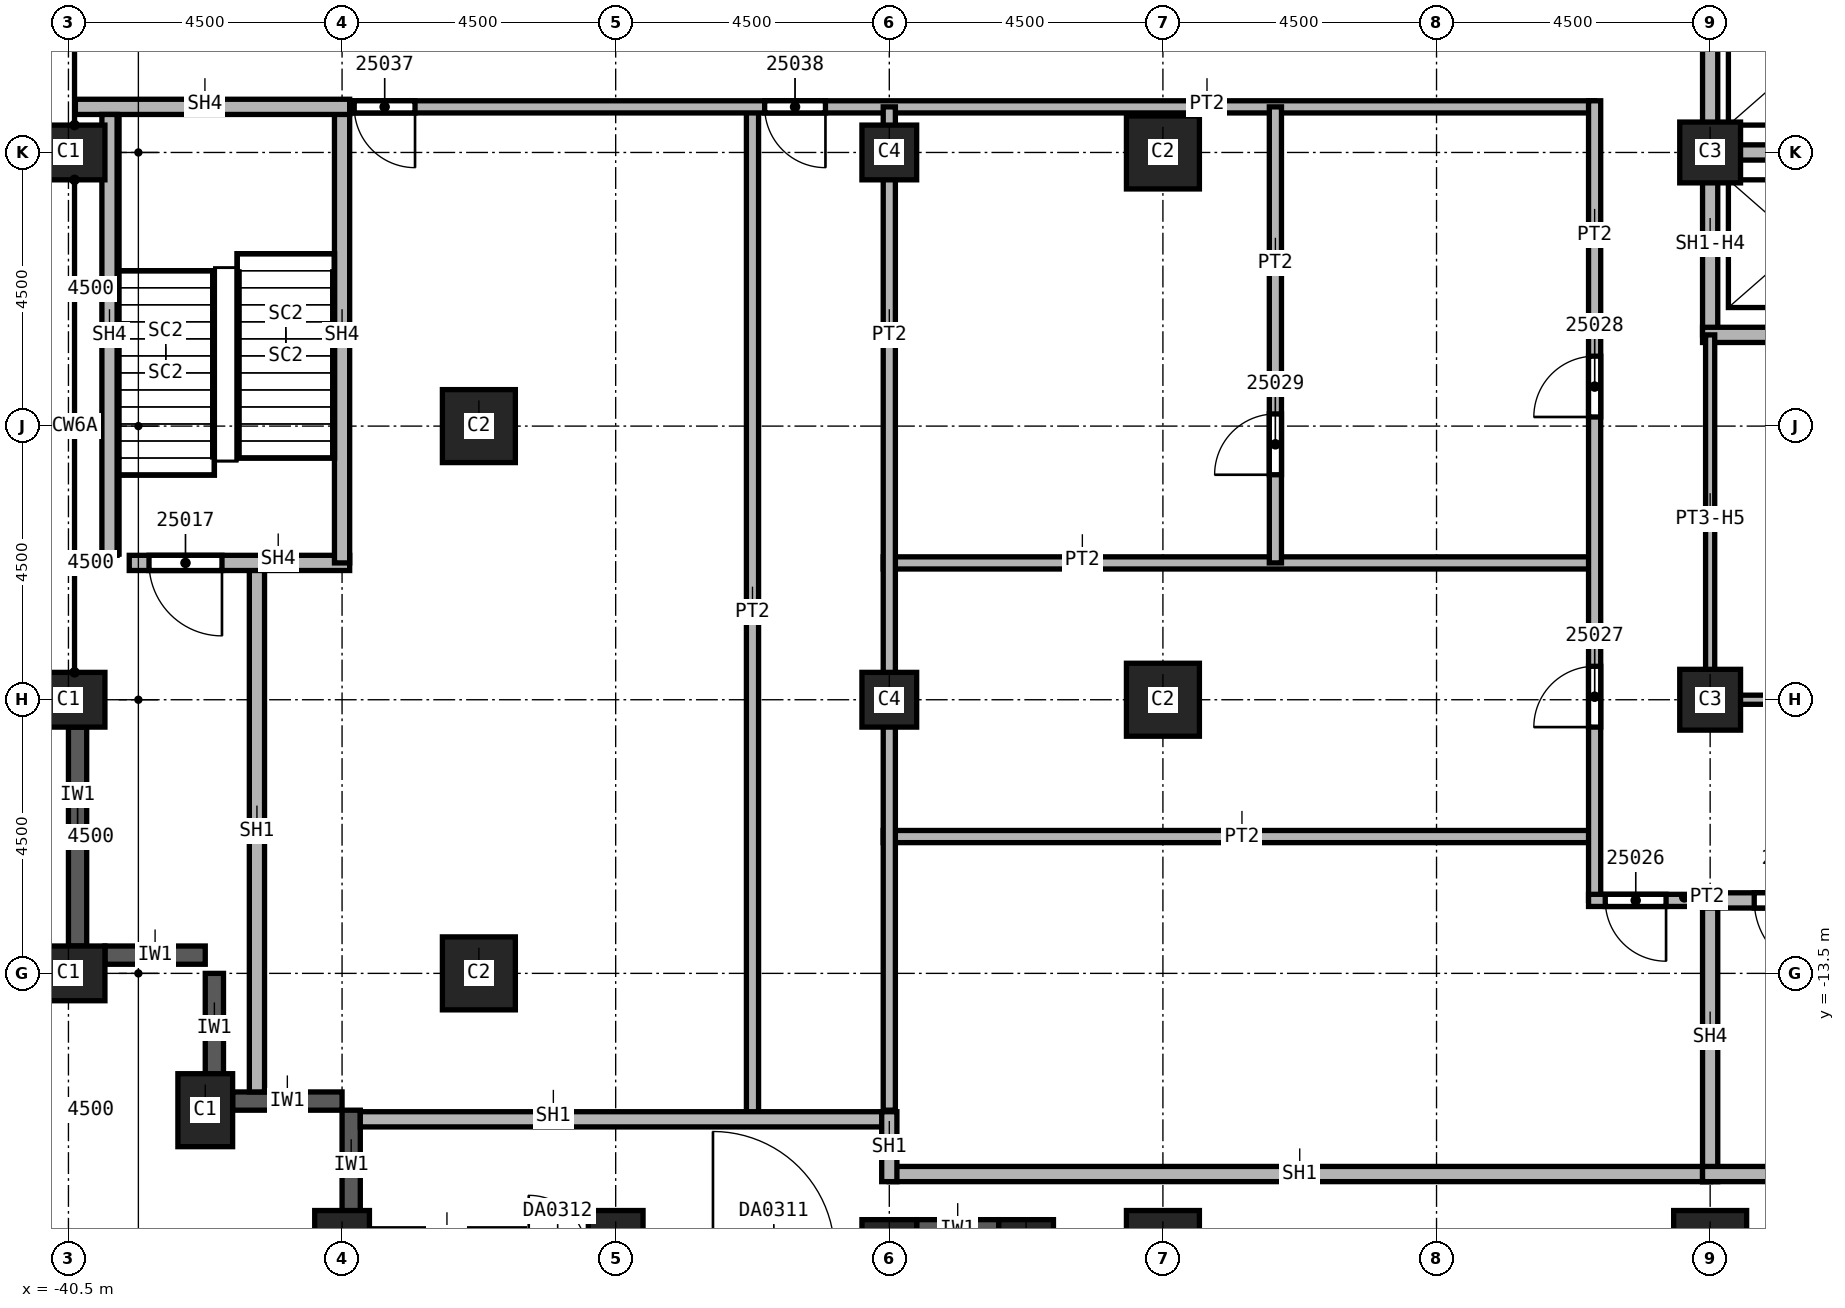
"""IFC4 building model, lengths in metres.
Left out: names, types, materials, properties, quantities, classifications, styles, units other than length and angle.
Written with IfcOpenShell. Run it as: python <this file> out.ifc"""

import sys

from ifc_helpers import new_model, si_unit, direction, frame, frame_2d, origin, origin_2d, place, context, subcontext, project, spatial, rectangle, extrude, element, fill, save


model = new_model("IFC4")
c1 = context("Model", 3, precision=1e-05, world=origin(), true_north=direction((0.0, 1.0)))
c2 = subcontext(c1, "Body", "Model", "MODEL_VIEW")
j1 = project(units=[si_unit("LENGTHUNIT", "METRE"), si_unit("PLANEANGLEUNIT", "RADIAN")], contexts=[c1])
p1 = place(None, origin())
s1 = spatial("IfcSite", under=j1, at=p1, CompositionType="ELEMENT")
p2 = place(p1, origin())
s2 = spatial("IfcBuilding", under=s1, at=p2, CompositionType="ELEMENT")
p3 = place(p2, frame((0.0, 0.0, 60.0)))
s3 = spatial("IfcBuildingStorey", under=s2, at=p3, CompositionType="ELEMENT", Elevation=60.0)
for number, where, z_axis, x_axis in (
    (1, (-40.5, 0.0, 0.0), (0.0, 0.0, 1.0), (0.0, 1.0, 0.0)),
    (2, (-40.5, -9.0, 0.0), (0.0, 0.0, 1.0), (0.0, 1.0, 0.0)),
    (3, (-40.5, -13.5, 0.0), (0.0, 0.0, 1.0), (0.0, 1.0, 0.0)),
    (4, (-38.25, -15.75, 0.0), (0.0, 0.0, 1.0), (1.0, 0.0, 0.0)),
    (5, (-31.5, -18.0, 0.0), (0.0, 0.0, 1.0), (1.0, 0.0, 0.0)),
    (6, (-36.0, -18.0, 0.0), (0.0, 0.0, 1.0), (1.0, 0.0, 0.0)),
):
    element("IfcColumn", number, at=place(p3, frame(where, z_axis=z_axis, x_axis=x_axis)), inside=s3, PredefinedType="COLUMN", context=c2, shape_type="SweptSolid", body=[
        extrude(rectangle(XDim=0.9, YDim=1.2, at=origin_2d()), origin(), (0.0, 0.0, 1.0), 7.7),
    ])
for number, where, z_axis, x_axis in (
    (7, (-33.75, -4.5, 0.0), (0.0, 0.0, 1.0), (1.0, 0.0, 0.0)),
    (8, (-33.75, -13.5, 0.0), (0.0, 0.0, 1.0), (1.0, 0.0, 0.0)),
    (9, (-13.5, -18.0, 0.0), (0.0, 0.0, 1.0), (1.0, 0.0, 0.0)),
    (10, (-22.5, 0.0, 0.0), (0.0, 0.0, 1.0), (1.0, 0.0, 0.0)),
    (11, (-22.5, -9.0, 0.0), (0.0, 0.0, 1.0), (1.0, 0.0, 0.0)),
    (12, (-22.5, -18.0, 0.0), (0.0, 0.0, 1.0), (1.0, 0.0, 0.0)),
):
    element("IfcColumn", number, at=place(p3, frame(where, z_axis=z_axis, x_axis=x_axis)), inside=s3, PredefinedType="COLUMN", context=c2, shape_type="SweptSolid", body=[
        extrude(rectangle(XDim=1.2, YDim=1.2, at=origin_2d()), origin(), (0.0, 0.0, 1.0), 7.7),
    ])
for number, where, z_axis, x_axis in (
    (13, (-13.5, 0.0, 0.0), (0.0, 0.0, 1.0), (1.0, 0.0, 0.0)),
    (14, (-13.5, -9.0, 0.0), (0.0, 0.0, 1.0), (1.0, 0.0, 0.0)),
):
    element("IfcColumn", number, at=place(p3, frame(where, z_axis=z_axis, x_axis=x_axis)), inside=s3, PredefinedType="COLUMN", context=c2, shape_type="SweptSolid", body=[
        extrude(rectangle(XDim=1.0, YDim=1.0, at=origin_2d()), origin(), (0.0, 0.0, 1.0), 7.7),
    ])
for number, where, z_axis, x_axis in (
    (15, (-27.0, 0.0, 0.0), (0.0, 0.0, 1.0), (1.0, 0.0, 0.0)),
    (16, (-27.0, -9.0, 0.0), (0.0, 0.0, 1.0), (1.0, 0.0, 0.0)),
    (17, (-27.0, -18.0, 0.0), (0.0, 0.0, 1.0), (1.0, 0.0, 0.0)),
    (18, (-24.75, -18.0, 0.0), (0.0, 0.0, 1.0), (1.0, 0.0, 0.0)),
):
    element("IfcColumn", number, at=place(p3, frame(where, z_axis=z_axis, x_axis=x_axis)), inside=s3, PredefinedType="COLUMN", context=c2, shape_type="SweptSolid", body=[
        extrude(rectangle(XDim=0.9, YDim=0.9, at=origin_2d()), origin(), (0.0, 0.0, 1.0), 7.7),
    ])
p4 = place(p3, frame((-39.9, -13.2, 0.0), z_axis=(0.0, 0.0, 1.0), x_axis=(1.0, 0.0, 0.0)))
e19 = element("IfcWall", 19, at=p4, inside=s3, PredefinedType="SOLIDWALL", context=c2, shape_type="SweptSolid", body=[
    extrude(rectangle(XDim=1.65, YDim=0.3, at=frame_2d((0.825, 0.0))), origin(), (0.0, 0.0, 1.0), 7.1),
])
for number, where, z_axis, x_axis in (
    (20, (-38.1, -15.3, 0.0), (0.0, 0.0, 1.0), (0.0, 1.0, 0.0)),
    (21, (-37.8, -15.6, 0.0), (0.0, 0.0, 1.0), (1.0, 0.0, 0.0)),
    (22, (-35.85, -17.55, 0.0), (0.0, 0.0, 1.0), (0.0, 1.0, 0.0)),
):
    element("IfcWall", number, at=place(p3, frame(where, z_axis=z_axis, x_axis=x_axis)), inside=s3, PredefinedType="SOLIDWALL", context=c2, shape_type="SweptSolid", body=[
        extrude(rectangle(XDim=1.8, YDim=0.3, at=frame_2d((0.9, 0.0))), origin(), (0.0, 0.0, 1.0), 7.1),
    ])
p5 = place(p3, frame((-40.35, -9.45, 0.0), z_axis=(0.0, 0.0, 1.0), x_axis=(0.0, -1.0, 0.0)))
e23 = element("IfcWall", 23, at=p5, inside=s3, PredefinedType="SOLIDWALL", context=c2, shape_type="SweptSolid", body=[
    extrude(rectangle(XDim=3.6, YDim=0.3, at=frame_2d((1.8, 0.0))), origin(), (0.0, 0.0, 1.0), 7.1),
])
p6 = place(p3, frame((-26.55, -17.7, 0.0), z_axis=(0.0, 0.0, 1.0), x_axis=(1.0, 0.0, 0.0)))
e24 = element("IfcWall", 24, at=p6, inside=s3, PredefinedType="SOLIDWALL", context=c2, shape_type="SweptSolid", body=[
    extrude(rectangle(XDim=1.35, YDim=0.3, at=frame_2d((0.675, 0.0))), origin(), (0.0, 0.0, 1.0), 7.1),
])
p7 = place(p3, frame((-29.25, 0.75, 0.0), z_axis=(0.0, 0.0, 1.0), x_axis=(0.0, -1.0, 0.0)))
e25 = element("IfcWall", 25, at=p7, inside=s3, PredefinedType="PARTITIONING", context=c2, shape_type="SweptSolid", body=[
    extrude(rectangle(XDim=16.65, YDim=0.2, at=frame_2d((8.325, 0.0))), origin(), (0.0, 0.0, 1.0), 7.7),
])
p8 = place(p3, frame((-15.4, 0.75, 0.0), z_axis=(0.0, 0.0, 1.0), x_axis=(-1.0, 0.0, 0.0)))
e26 = element("IfcWall", 26, at=p8, inside=s3, PredefinedType="PARTITIONING", context=c2, shape_type="SweptSolid", body=[
    extrude(rectangle(XDim=20.725, YDim=0.2, at=frame_2d((10.363, 0.0))), origin(), (0.0, 0.0, 1.0), 7.7),
])
p9 = place(p8, frame((19.4, 0.0, 0.0)))
e27 = element("IfcOpeningElement", 27, at=p9, cuts=e26, PredefinedType="OPENING", context=c2, shape_type="SweptSolid", body=[
    extrude(rectangle(XDim=1.0, YDim=2.1, at=frame_2d((0.5, 1.05))), frame((0.0, 0.1, 0.0), z_axis=(0.0, -1.0, 0.0), x_axis=(1.0, 0.0, 0.0)), (0.0, 0.0, 1.0), 0.2),
])
p10 = place(p8, frame((12.65, 0.0, 0.0)))
e28 = element("IfcOpeningElement", 28, at=p10, cuts=e26, PredefinedType="OPENING", context=c2, shape_type="SweptSolid", body=[
    extrude(rectangle(XDim=1.0, YDim=2.1, at=frame_2d((0.5, 1.05))), frame((0.0, 0.1, 0.0), z_axis=(0.0, -1.0, 0.0), x_axis=(1.0, 0.0, 0.0)), (0.0, 0.0, 1.0), 0.2),
])
for number, where, z_axis, x_axis in (
    (29, (-27.1, -11.25, 0.0), (0.0, 0.0, 1.0), (1.0, 0.0, 0.0)),
    (30, (-27.1, -6.75, 0.0), (0.0, 0.0, 1.0), (1.0, 0.0, 0.0)),
):
    element("IfcWall", number, at=place(p3, frame(where, z_axis=z_axis, x_axis=x_axis)), inside=s3, PredefinedType="PARTITIONING", context=c2, shape_type="SweptSolid", body=[
        extrude(rectangle(XDim=11.7, YDim=0.2, at=frame_2d((5.85, 0.0))), origin(), (0.0, 0.0, 1.0), 7.7),
    ])
p11 = place(p3, frame((-27.0, -15.75, 0.0), z_axis=(0.0, 0.0, 1.0), x_axis=(0.0, 1.0, 0.0)))
e31 = element("IfcWall", 31, at=p11, inside=s3, PredefinedType="PARTITIONING", context=c2, shape_type="SweptSolid", body=[
    extrude(rectangle(XDim=16.5, YDim=0.2, at=frame_2d((8.25, 0.0))), origin(), (0.0, 0.0, 1.0), 7.7),
])
p12 = place(p3, frame((-20.65, -6.75, 0.0), z_axis=(0.0, 0.0, 1.0), x_axis=(0.0, 1.0, 0.0)))
e32 = element("IfcWall", 32, at=p12, inside=s3, PredefinedType="PARTITIONING", context=c2, shape_type="SweptSolid", body=[
    extrude(rectangle(XDim=7.5, YDim=0.2, at=frame_2d((3.75, 0.0))), origin(), (0.0, 0.0, 1.0), 7.7),
])
p13 = place(p12, frame((1.45, 0.0, 0.0)))
e33 = element("IfcOpeningElement", 33, at=p13, cuts=e32, PredefinedType="OPENING", context=c2, shape_type="SweptSolid", body=[
    extrude(rectangle(XDim=1.0, YDim=2.1, at=frame_2d((0.5, 1.05))), frame((0.0, 0.1, 0.0), z_axis=(0.0, -1.0, 0.0), x_axis=(1.0, 0.0, 0.0)), (0.0, 0.0, 1.0), 0.2),
])
p14 = place(p3, frame((-15.4, -12.3, 0.0), z_axis=(0.0, 0.0, 1.0), x_axis=(0.0, 1.0, 0.0)))
e34 = element("IfcWall", 34, at=p14, inside=s3, PredefinedType="PARTITIONING", context=c2, shape_type="SweptSolid", body=[
    extrude(rectangle(XDim=13.15, YDim=0.2, at=frame_2d((6.575, 0.0))), origin(), (0.0, 0.0, 1.0), 7.7),
])
p15 = place(p14, frame((2.85, 0.0, 0.0)))
e35 = element("IfcOpeningElement", 35, at=p15, cuts=e34, PredefinedType="OPENING", context=c2, shape_type="SweptSolid", body=[
    extrude(rectangle(XDim=1.0, YDim=2.1, at=frame_2d((0.5, 1.05))), frame((0.0, 0.1, 0.0), z_axis=(0.0, -1.0, 0.0), x_axis=(1.0, 0.0, 0.0)), (0.0, 0.0, 1.0), 0.2),
])
p16 = place(p14, frame((7.95, 0.0, 0.0)))
e36 = element("IfcOpeningElement", 36, at=p16, cuts=e34, PredefinedType="OPENING", context=c2, shape_type="SweptSolid", body=[
    extrude(rectangle(XDim=1.0, YDim=2.1, at=frame_2d((0.5, 1.05))), frame((0.0, 0.1, 0.0), z_axis=(0.0, -1.0, 0.0), x_axis=(1.0, 0.0, 0.0)), (0.0, 0.0, 1.0), 0.2),
])
p17 = place(p3, frame((-13.375, -12.3, 0.0), z_axis=(0.0, 0.0, 1.0), x_axis=(-1.0, 0.0, 0.0)))
e37 = element("IfcWall", 37, at=p17, inside=s3, PredefinedType="PARTITIONING", context=c2, shape_type="SweptSolid", body=[
    extrude(rectangle(XDim=2.125, YDim=0.2, at=frame_2d((1.062, 0.0))), origin(), (0.0, 0.0, 1.0), 7.7),
])
p18 = place(p17, frame((0.85, 0.0, 0.0)))
e38 = element("IfcOpeningElement", 38, at=p18, cuts=e37, PredefinedType="OPENING", context=c2, shape_type="SweptSolid", body=[
    extrude(rectangle(XDim=1.0, YDim=2.1, at=frame_2d((0.5, 1.05))), frame((0.0, 0.1, 0.0), z_axis=(0.0, -1.0, 0.0), x_axis=(1.0, 0.0, 0.0)), (0.0, 0.0, 1.0), 0.2),
])
for number, where, z_axis, x_axis in (
    (39, (-37.4, -6.75, 0.0), (0.0, 0.0, 1.0), (0.0, -1.0, 0.0)),
    (40, (-35.7, -15.9, 0.0), (0.0, 0.0, 1.0), (1.0, 0.0, 0.0)),
):
    element("IfcWall", number, at=place(p3, frame(where, z_axis=z_axis, x_axis=x_axis)), inside=s3, PredefinedType="SOLIDWALL", context=c2, shape_type="SweptSolid", body=[
        extrude(rectangle(XDim=8.7, YDim=0.25, at=frame_2d((4.35, 0.0))), origin(), (0.0, 0.0, 1.0), 7.7),
    ])
p19 = place(p3, frame((-27.0, -16.8, 0.0), z_axis=(0.0, 0.0, 1.0), x_axis=(1.0, 0.0, 0.0)))
e41 = element("IfcWall", 41, at=p19, inside=s3, PredefinedType="SOLIDWALL", context=c2, shape_type="SweptSolid", body=[
    extrude(rectangle(XDim=13.5, YDim=0.25, at=frame_2d((6.75, 0.0))), origin(), (0.0, 0.0, 1.0), 7.7),
])
p20 = place(p3, frame((-27.0, -15.775, 0.0), z_axis=(0.0, 0.0, 1.0), x_axis=(0.0, -1.0, 0.0)))
e42 = element("IfcWall", 42, at=p20, inside=s3, PredefinedType="SOLIDWALL", context=c2, shape_type="SweptSolid", body=[
    extrude(rectangle(XDim=1.15, YDim=0.25, at=frame_2d((0.575, 0.0))), origin(), (0.0, 0.0, 1.0), 7.7),
])
p21 = place(p3, frame((-13.625, 0.0, 0.0), z_axis=(0.0, 0.0, 1.0), x_axis=(1.0, 0.0, 0.0)))
e43 = element("IfcWall", 43, at=p21, inside=s3, PredefinedType="SOLIDWALL", context=c2, shape_type="SweptSolid", body=[
    extrude(rectangle(XDim=3.125, YDim=0.25, at=frame_2d((1.562, 0.0))), origin(), (0.0, 0.0, 1.0), 7.7),
])
p22 = place(p3, frame((-13.5, -3.0, 0.0), z_axis=(0.0, 0.0, 1.0), x_axis=(0.0, 1.0, 0.0)))
e44 = element("IfcWall", 44, at=p22, inside=s3, PredefinedType="SOLIDWALL", context=c2, shape_type="SweptSolid", body=[
    extrude(rectangle(XDim=6.0, YDim=0.25, at=frame_2d((3.0, 0.0))), origin(), (0.0, 0.0, 1.0), 6.938),
])
p23 = place(p3, frame((-13.625, -3.0, 0.0), z_axis=(0.0, 0.0, 1.0), x_axis=(1.0, 0.0, 0.0)))
e45 = element("IfcWall", 45, at=p23, inside=s3, PredefinedType="SOLIDWALL", context=c2, shape_type="SweptSolid", body=[
    extrude(rectangle(XDim=9.25, YDim=0.25, at=frame_2d((4.625, 0.0))), origin(), (0.0, 0.0, 1.0), 7.7),
])
p24 = place(p23, frame((3.25, 0.0, 0.0)))
e46 = element("IfcOpeningElement", 46, at=p24, cuts=e45, PredefinedType="OPENING", context=c2, shape_type="SweptSolid", body=[
    extrude(rectangle(XDim=1.1, YDim=2.1, at=frame_2d((0.55, 1.05))), frame((0.0, 0.125, 0.0), z_axis=(0.0, -1.0, 0.0), x_axis=(1.0, 0.0, 0.0)), (0.0, 0.0, 1.0), 0.25),
])
p25 = place(p3, frame((-35.875, -6.75, 0.0), z_axis=(0.0, 0.0, 1.0), x_axis=(-1.0, 0.0, 0.0)))
e47 = element("IfcWall", 47, at=p25, inside=s3, PredefinedType="SOLIDWALL", context=c2, shape_type="SweptSolid", body=[
    extrude(rectangle(XDim=3.625, YDim=0.25, at=frame_2d((1.812, 0.0))), origin(), (0.0, 0.0, 1.0), 7.7),
])
p26 = place(p25, frame((2.1, 0.0, 0.0)))
e48 = element("IfcOpeningElement", 48, at=p26, cuts=e47, PredefinedType="OPENING", context=c2, shape_type="SweptSolid", body=[
    extrude(rectangle(XDim=1.2, YDim=2.1, at=frame_2d((0.6, 1.05))), frame((0.0, 0.125, 0.0), z_axis=(0.0, -1.0, 0.0), x_axis=(1.0, 0.0, 0.0)), (0.0, 0.0, 1.0), 0.25),
])
p27 = place(p3, frame((-36.0, 0.75, 0.0), z_axis=(0.0, 0.0, 1.0), x_axis=(0.0, -1.0, 0.0)))
e49 = element("IfcWall", 49, at=p27, inside=s3, PredefinedType="SOLIDWALL", context=c2, shape_type="SweptSolid", body=[
    extrude(rectangle(XDim=7.5, YDim=0.25, at=frame_2d((3.75, 0.0))), origin(), (0.0, 0.0, 1.0), 7.7),
])
p28 = place(p3, frame((-35.875, 0.75, 0.0), z_axis=(0.0, 0.0, 1.0), x_axis=(-1.0, 0.0, 0.0)))
e50 = element("IfcWall", 50, at=p28, inside=s3, PredefinedType="SOLIDWALL", context=c2, shape_type="SweptSolid", body=[
    extrude(rectangle(XDim=4.511, YDim=0.25, at=frame_2d((2.255, 0.0))), origin(), (0.0, 0.0, 1.0), 7.7),
])
p29 = place(p3, frame((-13.5, -16.925, 0.0), z_axis=(0.0, 0.0, 1.0), x_axis=(0.0, 1.0, 0.0)))
e51 = element("IfcWall", 51, at=p29, inside=s3, PredefinedType="SOLIDWALL", context=c2, shape_type="SweptSolid", body=[
    extrude(rectangle(XDim=4.625, YDim=0.25, at=frame_2d((2.312, 0.0))), origin(), (0.0, 0.0, 1.0), 7.7),
])
p30 = place(p3, frame((-4.375, -16.8, 0.0), z_axis=(0.0, 0.0, 1.0), x_axis=(-1.0, 0.0, 0.0)))
e52 = element("IfcWall", 52, at=p30, inside=s3, PredefinedType="SOLIDWALL", context=c2, shape_type="SweptSolid", body=[
    extrude(rectangle(XDim=9.25, YDim=0.25, at=frame_2d((4.625, 0.0))), origin(), (0.0, 0.0, 1.0), 7.7),
])
p31 = place(p3, frame((-4.375, -12.3, 0.0), z_axis=(0.0, 0.0, 1.0), x_axis=(-1.0, 0.0, 0.0)))
e53 = element("IfcWall", 53, at=p31, inside=s3, PredefinedType="SOLIDWALL", context=c2, shape_type="SweptSolid", body=[
    extrude(rectangle(XDim=9.25, YDim=0.25, at=frame_2d((4.625, 0.0))), origin(), (0.0, 0.0, 1.0), 7.7),
])
p32 = place(p31, frame((7.2, 0.0, 0.0)))
e54 = element("IfcOpeningElement", 54, at=p32, cuts=e53, PredefinedType="OPENING", context=c2, shape_type="SweptSolid", body=[
    extrude(rectangle(XDim=1.2, YDim=2.1, at=frame_2d((0.6, 1.05))), frame((0.0, 0.125, 0.0), z_axis=(0.0, -1.0, 0.0), x_axis=(1.0, 0.0, 0.0)), (0.0, 0.0, 1.0), 0.25),
])
p33 = place(p3, frame((-13.5, -9.075, 0.0), z_axis=(0.0, 0.0, 1.0), x_axis=(0.0, 1.0, 0.0)))
e55 = element("IfcWall", 55, at=p33, inside=s3, PredefinedType="PARTITIONING", context=c2, shape_type="SweptSolid", body=[
    extrude(rectangle(XDim=6.075, YDim=0.15, at=frame_2d((3.038, 0.0))), origin(), (0.0, 0.0, 1.0), 6.938),
])
p34 = place(p3, frame((-10.5, -9.0, 0.0), z_axis=(0.0, 0.0, 1.0), x_axis=(-1.0, 0.0, 0.0)))
e56 = element("IfcWall", 56, at=p34, inside=s3, PredefinedType="PARTITIONING", context=c2, shape_type="SweptSolid", body=[
    extrude(rectangle(XDim=3.0, YDim=0.15, at=frame_2d((1.5, 0.0))), origin(), (0.0, 0.0, 1.0), 6.938),
])
p35 = place(p3, frame((-39.825, -6.625, 0.0), z_axis=(0.0, 0.0, 1.0), x_axis=(0.0, 1.0, 0.0)))
e57 = element("IfcWall", 57, at=p35, inside=s3, PredefinedType="SOLIDWALL", context=c2, shape_type="SweptSolid", body=[
    extrude(rectangle(XDim=7.25, YDim=0.25, at=frame_2d((3.625, 0.0))), origin(), (0.0, 0.0, 1.0), 7.7),
])
p36 = place(p32, origin())
e58 = element("IfcDoor", 58, at=p36, inside=s3, OperationType="SINGLE_SWING_RIGHT", PredefinedType="DOOR", context=c2, shape_type="SweptSolid", body=[
    extrude(rectangle(XDim=1.2, YDim=2.1, at=frame_2d((0.6, 1.05))), frame((0.0, 0.025, 0.0), z_axis=(0.0, -1.0, 0.0), x_axis=(1.0, 0.0, 0.0)), (0.0, 0.0, 1.0), 0.05),
])
fill(e54, e58)
p37 = place(p26, origin())
e59 = element("IfcDoor", 59, at=p37, inside=s3, OperationType="SINGLE_SWING_RIGHT", PredefinedType="DOOR", context=c2, shape_type="SweptSolid", body=[
    extrude(rectangle(XDim=1.2, YDim=2.1, at=frame_2d((0.6, 1.05))), frame((0.0, 0.025, 0.0), z_axis=(0.0, -1.0, 0.0), x_axis=(1.0, 0.0, 0.0)), (0.0, 0.0, 1.0), 0.05),
])
fill(e48, e59)
p38 = place(p18, origin())
e60 = element("IfcDoor", 60, at=p38, inside=s3, OperationType="SINGLE_SWING_LEFT", PredefinedType="DOOR", context=c2, shape_type="SweptSolid", body=[
    extrude(rectangle(XDim=1.0, YDim=2.1, at=frame_2d((0.5, 1.05))), frame((0.0, 0.025, 0.0), z_axis=(0.0, -1.0, 0.0), x_axis=(1.0, 0.0, 0.0)), (0.0, 0.0, 1.0), 0.05),
])
fill(e38, e60)
p39 = place(p15, origin())
e61 = element("IfcDoor", 61, at=p39, inside=s3, OperationType="SINGLE_SWING_RIGHT", PredefinedType="DOOR", context=c2, shape_type="SweptSolid", body=[
    extrude(rectangle(XDim=1.0, YDim=2.1, at=frame_2d((0.5, 1.05))), frame((0.0, 0.025, 0.0), z_axis=(0.0, -1.0, 0.0), x_axis=(1.0, 0.0, 0.0)), (0.0, 0.0, 1.0), 0.05),
])
fill(e35, e61)
p40 = place(p16, origin())
e62 = element("IfcDoor", 62, at=p40, inside=s3, OperationType="SINGLE_SWING_LEFT", PredefinedType="DOOR", context=c2, shape_type="SweptSolid", body=[
    extrude(rectangle(XDim=1.0, YDim=2.1, at=frame_2d((0.5, 1.05))), frame((0.0, 0.025, 0.0), z_axis=(0.0, -1.0, 0.0), x_axis=(1.0, 0.0, 0.0)), (0.0, 0.0, 1.0), 0.05),
])
fill(e36, e62)
p41 = place(p13, origin())
e63 = element("IfcDoor", 63, at=p41, inside=s3, OperationType="SINGLE_SWING_RIGHT", PredefinedType="DOOR", context=c2, shape_type="SweptSolid", body=[
    extrude(rectangle(XDim=1.0, YDim=2.1, at=frame_2d((0.5, 1.05))), frame((0.0, 0.025, 0.0), z_axis=(0.0, -1.0, 0.0), x_axis=(1.0, 0.0, 0.0)), (0.0, 0.0, 1.0), 0.05),
])
fill(e33, e63)
p42 = place(p9, origin())
e64 = element("IfcDoor", 64, at=p42, inside=s3, OperationType="SINGLE_SWING_RIGHT", PredefinedType="DOOR", context=c2, shape_type="SweptSolid", body=[
    extrude(rectangle(XDim=1.0, YDim=2.1, at=frame_2d((0.5, 1.05))), frame((0.0, 0.025, 0.0), z_axis=(0.0, -1.0, 0.0), x_axis=(1.0, 0.0, 0.0)), (0.0, 0.0, 1.0), 0.05),
])
fill(e27, e64)
p43 = place(p10, origin())
e65 = element("IfcDoor", 65, at=p43, inside=s3, OperationType="SINGLE_SWING_LEFT", PredefinedType="DOOR", context=c2, shape_type="SweptSolid", body=[
    extrude(rectangle(XDim=1.0, YDim=2.1, at=frame_2d((0.5, 1.05))), frame((0.0, 0.025, 0.0), z_axis=(0.0, -1.0, 0.0), x_axis=(1.0, 0.0, 0.0)), (0.0, 0.0, 1.0), 0.05),
])
fill(e28, e65)
save(model, sys.argv[1])
